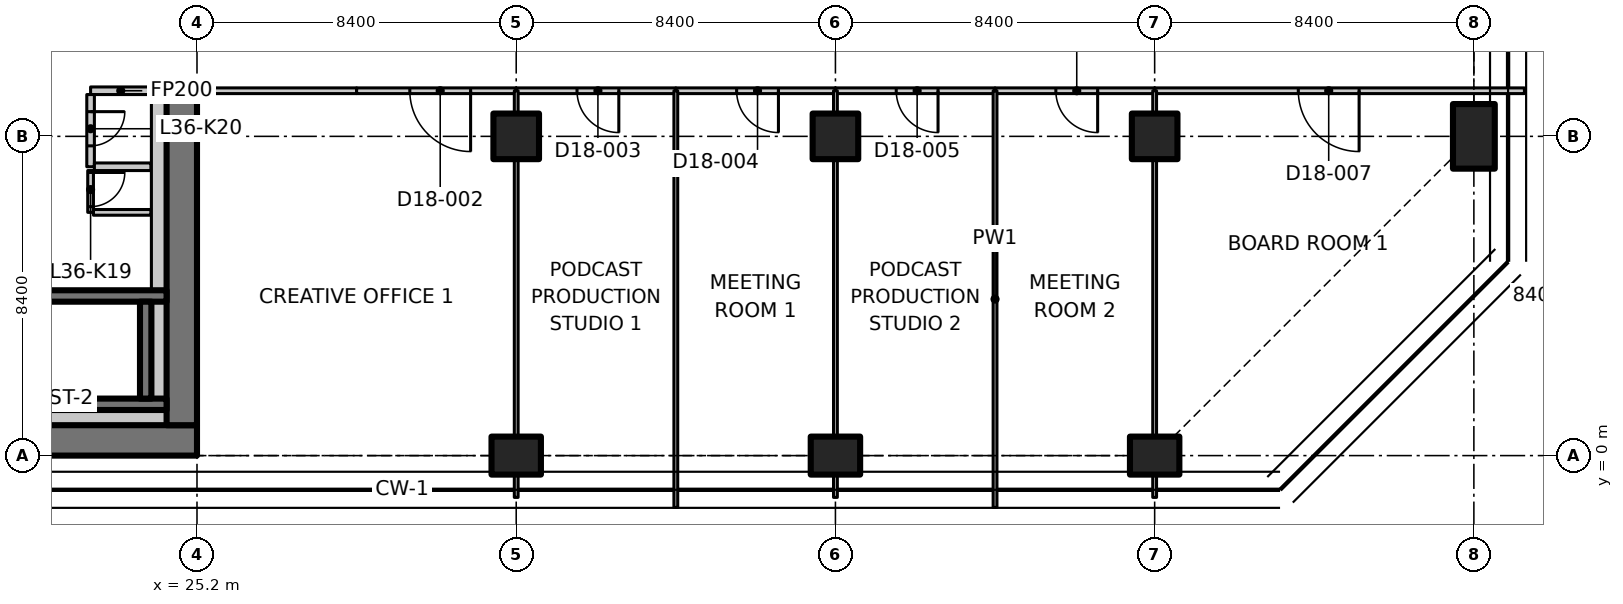
"""IFC4 building model, lengths in metres.
Left out: names, types, materials, properties, quantities, classifications, styles, units other than length and angle.
Written with IfcOpenShell. Run it as: python <this file> out.ifc"""

import sys

from ifc_helpers import new_model, si_unit, direction, frame, frame_2d, origin, origin_2d, place, context, subcontext, project, spatial, polyline, rectangle, outline, extrude, element, fill, save


model = new_model("IFC4")
c1 = context("Model", 3, precision=1e-05, world=origin(), true_north=direction((0.0, 1.0)))
c2 = subcontext(c1, "Body", "Model", "MODEL_VIEW")
j1 = project(units=[si_unit("LENGTHUNIT", "METRE"), si_unit("PLANEANGLEUNIT", "RADIAN")], contexts=[c1])
p1 = place(None, origin())
s1 = spatial("IfcSite", under=j1, at=p1, CompositionType="ELEMENT")
p2 = place(p1, origin())
s2 = spatial("IfcBuilding", under=s1, at=p2, CompositionType="ELEMENT")
p3 = place(p2, frame((0.0, 0.0, 145.7)))
s3 = spatial("IfcBuildingStorey", under=s2, at=p3, CompositionType="ELEMENT", Elevation=145.7)
p4 = place(p3, frame((33.6, 0.0, 0.0), z_axis=(0.0, 0.0, 1.0), x_axis=(0.0, 1.0, 0.0)))
e1 = element("IfcColumn", 1, at=p4, inside=s3, PredefinedType="COLUMN", context=c2, shape_type="SweptSolid", body=[
    extrude(rectangle(XDim=1.0, YDim=1.3, at=origin_2d()), origin(), (0.0, 0.0, 1.0), 3.35),
])
p5 = place(p3, frame((33.6, 8.4, 0.0), z_axis=(0.0, 0.0, 1.0), x_axis=(1.0, 0.0, 0.0)))
e2 = element("IfcColumn", 2, at=p5, inside=s3, PredefinedType="COLUMN", context=c2, shape_type="SweptSolid", body=[
    extrude(rectangle(XDim=1.2, YDim=1.2, at=origin_2d()), origin(), (0.0, 0.0, 1.0), 3.35),
])
p6 = place(p3, frame((42.0, 0.0, 0.0), z_axis=(0.0, 0.0, 1.0), x_axis=(0.0, 1.0, 0.0)))
e3 = element("IfcColumn", 3, at=p6, inside=s3, PredefinedType="COLUMN", context=c2, shape_type="SweptSolid", body=[
    extrude(rectangle(XDim=1.0, YDim=1.3, at=origin_2d()), origin(), (0.0, 0.0, 1.0), 3.35),
])
p7 = place(p3, frame((42.0, 8.4, 0.0), z_axis=(0.0, 0.0, 1.0), x_axis=(1.0, 0.0, 0.0)))
e4 = element("IfcColumn", 4, at=p7, inside=s3, PredefinedType="COLUMN", context=c2, shape_type="SweptSolid", body=[
    extrude(rectangle(XDim=1.2, YDim=1.2, at=origin_2d()), origin(), (0.0, 0.0, 1.0), 3.35),
])
p8 = place(p3, frame((50.4, 0.0, 0.0), z_axis=(0.0, 0.0, 1.0), x_axis=(0.0, 1.0, 0.0)))
e5 = element("IfcColumn", 5, at=p8, inside=s3, PredefinedType="COLUMN", context=c2, shape_type="SweptSolid", body=[
    extrude(rectangle(XDim=1.0, YDim=1.3, at=origin_2d()), origin(), (0.0, 0.0, 1.0), 3.35),
])
p9 = place(p3, frame((50.4, 8.4, 0.0), z_axis=(0.0, 0.0, 1.0), x_axis=(1.0, 0.0, 0.0)))
e6 = element("IfcColumn", 6, at=p9, inside=s3, PredefinedType="COLUMN", context=c2, shape_type="SweptSolid", body=[
    extrude(rectangle(XDim=1.2, YDim=1.2, at=origin_2d()), origin(), (0.0, 0.0, 1.0), 3.35),
])
p10 = place(p3, frame((58.8, 8.4, 0.0), z_axis=(0.0, 0.0, 1.0), x_axis=(1.0, 0.0, 0.0)))
e7 = element("IfcColumn", 7, at=p10, inside=s3, PredefinedType="COLUMN", context=c2, shape_type="SweptSolid", body=[
    extrude(rectangle(XDim=1.1, YDim=1.7, at=origin_2d()), origin(), (0.0, 0.0, 1.0), 3.35),
])
p11 = place(p3, frame((7.136, 0.4, 0.0), z_axis=(0.0, 0.0, 1.0), x_axis=(1.0, 0.0, 0.0)))
e8 = element("IfcWall", 8, at=p11, inside=s3, PredefinedType="SHEAR", context=c2, shape_type="SweptSolid", body=[
    extrude(rectangle(XDim=18.063, YDim=0.8, at=frame_2d((9.032, 0.0))), origin(), (0.0, 0.0, 1.0), 3.35),
])
p12 = place(p3, frame((24.8, 0.8, 0.0), z_axis=(0.0, 0.0, 1.0), x_axis=(0.0, 1.0, 0.0)))
e9 = element("IfcWall", 9, at=p12, inside=s3, PredefinedType="SHEAR", context=c2, shape_type="SweptSolid", body=[
    extrude(rectangle(XDim=9.0, YDim=0.8, at=frame_2d((4.5, 0.0))), origin(), (0.0, 0.0, 1.0), 3.35),
])
p13 = place(p3, frame((15.8, 1.35, 0.0), z_axis=(0.0, 0.0, 1.0), x_axis=(1.0, 0.0, 0.0)))
e10 = element("IfcWall", 10, at=p13, inside=s3, PredefinedType="SHEAR", context=c2, shape_type="SweptSolid", body=[
    extrude(rectangle(XDim=8.6, YDim=0.3, at=frame_2d((4.3, 0.0))), origin(), (0.0, 0.0, 1.0), 3.35),
])
p14 = place(p3, frame((15.8, 4.2, 0.0), z_axis=(0.0, 0.0, 1.0), x_axis=(1.0, 0.0, 0.0)))
e11 = element("IfcWall", 11, at=p14, inside=s3, PredefinedType="SHEAR", context=c2, shape_type="SweptSolid", body=[
    extrude(rectangle(XDim=8.6, YDim=0.3, at=frame_2d((4.3, 0.0))), origin(), (0.0, 0.0, 1.0), 3.35),
])
p15 = place(p14, frame((0.4, 0.0, 0.0)))
e12 = element("IfcOpeningElement", 12, at=p15, cuts=e11, PredefinedType="OPENING", context=c2, shape_type="SweptSolid", body=[
    extrude(rectangle(XDim=1.0, YDim=2.1, at=frame_2d((0.5, 1.05))), frame((0.0, 0.16, 0.0), z_axis=(0.0, -1.0, 0.0), x_axis=(1.0, 0.0, 0.0)), (0.0, 0.0, 1.0), 0.32),
])
p16 = place(p3, frame((23.85, 1.5, 0.0), z_axis=(0.0, 0.0, 1.0), x_axis=(0.0, 1.0, 0.0)))
e13 = element("IfcWall", 13, at=p16, inside=s3, PredefinedType="SHEAR", context=c2, shape_type="SweptSolid", body=[
    extrude(rectangle(XDim=2.55, YDim=0.3, at=frame_2d((1.275, 0.0))), origin(), (0.0, 0.0, 1.0), 3.35),
])
p17 = place(p3, frame((23.988, 9.6, 0.0), z_axis=(0.0, 0.0, 1.0), x_axis=(-1.0, 0.0, 0.0)))
e14 = element("IfcWall", 14, at=p17, inside=s3, PredefinedType="PARTITIONING", context=c2, shape_type="SweptSolid", body=[
    extrude(rectangle(XDim=1.588, YDim=0.2, at=frame_2d((0.794, 0.0))), origin(), (0.0, 0.0, 1.0), 3.35),
])
p18 = place(p3, frame((22.4, 9.5, 0.0), z_axis=(0.0, 0.0, 1.0), x_axis=(0.0, -1.0, 0.0)))
e15 = element("IfcWall", 15, at=p18, inside=s3, PredefinedType="PARTITIONING", context=c2, shape_type="SweptSolid", body=[
    extrude(rectangle(XDim=1.9, YDim=0.2, at=frame_2d((0.95, 0.0))), origin(), (0.0, 0.0, 1.0), 3.35),
])
p19 = place(p18, frame((0.45, 0.0, 0.0)))
e16 = element("IfcOpeningElement", 16, at=p19, cuts=e15, PredefinedType="OPENING", context=c2, shape_type="SweptSolid", body=[
    extrude(rectangle(XDim=0.9, YDim=2.1, at=frame_2d((0.45, 1.05))), frame((0.0, 0.11, 0.0), z_axis=(0.0, -1.0, 0.0), x_axis=(1.0, 0.0, 0.0)), (0.0, 0.0, 1.0), 0.22),
])
p20 = place(p3, frame((22.5, 7.6, 0.0), z_axis=(0.0, 0.0, 1.0), x_axis=(1.0, 0.0, 0.0)))
e17 = element("IfcWall", 17, at=p20, inside=s3, PredefinedType="PARTITIONING", context=c2, shape_type="SweptSolid", body=[
    extrude(rectangle(XDim=1.488, YDim=0.2, at=frame_2d((0.744, 0.0))), origin(), (0.0, 0.0, 1.0), 3.35),
])
p21 = place(p3, frame((22.4, 7.5, 0.0), z_axis=(0.0, 0.0, 1.0), x_axis=(0.0, -1.0, 0.0)))
e18 = element("IfcWall", 18, at=p21, inside=s3, PredefinedType="PARTITIONING", context=c2, shape_type="SweptSolid", body=[
    extrude(rectangle(XDim=1.1, YDim=0.15, at=frame_2d((0.55, 0.0))), origin(), (0.0, 0.0, 1.0), 3.35),
])
p22 = place(p21, frame((0.05, 0.0, 0.0)))
e19 = element("IfcOpeningElement", 19, at=p22, cuts=e18, PredefinedType="OPENING", context=c2, shape_type="SweptSolid", body=[
    extrude(rectangle(XDim=0.9, YDim=2.1, at=frame_2d((0.45, 1.05))), frame((0.0, 0.085, 0.0), z_axis=(0.0, -1.0, 0.0), x_axis=(1.0, 0.0, 0.0)), (0.0, 0.0, 1.0), 0.17),
])
p23 = place(p3, frame((22.475, 6.4, 0.0), z_axis=(0.0, 0.0, 1.0), x_axis=(1.0, 0.0, 0.0)))
e20 = element("IfcWall", 20, at=p23, inside=s3, PredefinedType="PARTITIONING", context=c2, shape_type="SweptSolid", body=[
    extrude(rectangle(XDim=1.513, YDim=0.15, at=frame_2d((0.756, 0.0))), origin(), (0.0, 0.0, 1.0), 3.35),
])
p24 = place(p3, frame((13.35, 1.0, 0.0), z_axis=(0.0, 0.0, 1.0), x_axis=(1.0, 0.0, 0.0)))
e21 = element("IfcWall", 21, at=p24, inside=s3, PredefinedType="PARTITIONING", context=c2, shape_type="SweptSolid", body=[
    extrude(rectangle(XDim=11.05, YDim=0.4, at=frame_2d((5.525, 0.0))), origin(), (0.0, 0.0, 1.0), 3.35),
])
p25 = place(p3, frame((24.2, 1.5, 0.0), z_axis=(0.0, 0.0, 1.0), x_axis=(0.0, 1.0, 0.0)))
e22 = element("IfcWall", 22, at=p25, inside=s3, PredefinedType="PARTITIONING", context=c2, shape_type="SweptSolid", body=[
    extrude(rectangle(XDim=2.55, YDim=0.4, at=frame_2d((1.275, 0.0))), origin(), (0.0, 0.0, 1.0), 3.35),
])
p26 = place(p3, frame((24.2, 4.35, 0.0), z_axis=(0.0, 0.0, 1.0), x_axis=(0.0, 1.0, 0.0)))
e23 = element("IfcWall", 23, at=p26, inside=s3, PredefinedType="PARTITIONING", context=c2, shape_type="SweptSolid", body=[
    extrude(rectangle(XDim=5.45, YDim=0.4, at=frame_2d((2.725, 0.0))), origin(), (0.0, 0.0, 1.0), 3.35),
])
p27 = place(p3, frame((29.4, 9.6, 0.0), z_axis=(0.0, 0.0, 1.0), x_axis=(-1.0, 0.0, 0.0)))
e24 = element("IfcWall", 24, at=p27, inside=s3, PredefinedType="PARTITIONING", context=c2, shape_type="SweptSolid", body=[
    extrude(rectangle(XDim=4.2, YDim=0.15, at=frame_2d((2.1, 0.0))), origin(), (0.0, 0.0, 1.0), 3.33),
])
p28 = place(p3, frame((33.6, 9.6, 0.0), z_axis=(0.0, 0.0, 1.0), x_axis=(-1.0, 0.0, 0.0)))
e25 = element("IfcWall", 25, at=p28, inside=s3, PredefinedType="PARTITIONING", context=c2, shape_type="SweptSolid", body=[
    extrude(rectangle(XDim=4.2, YDim=0.15, at=frame_2d((2.1, 0.0))), origin(), (0.0, 0.0, 1.0), 3.33),
])
p29 = place(p28, frame((1.2, 0.0, 0.0)))
e26 = element("IfcOpeningElement", 26, at=p29, cuts=e25, PredefinedType="OPENING", context=c2, shape_type="SweptSolid", body=[
    extrude(rectangle(XDim=1.6, YDim=2.1, at=frame_2d((0.8, 1.05))), frame((0.0, 0.085, 0.0), z_axis=(0.0, -1.0, 0.0), x_axis=(1.0, 0.0, 0.0)), (0.0, 0.0, 1.0), 0.17),
])
p30 = place(p3, frame((37.8, 9.6, 0.0), z_axis=(0.0, 0.0, 1.0), x_axis=(-1.0, 0.0, 0.0)))
e27 = element("IfcWall", 27, at=p30, inside=s3, PredefinedType="PARTITIONING", context=c2, shape_type="SweptSolid", body=[
    extrude(rectangle(XDim=4.2, YDim=0.15, at=frame_2d((2.1, 0.0))), origin(), (0.0, 0.0, 1.0), 3.33),
])
p31 = place(p30, frame((1.5, 0.0, 0.0)))
e28 = element("IfcOpeningElement", 28, at=p31, cuts=e27, PredefinedType="OPENING", context=c2, shape_type="SweptSolid", body=[
    extrude(rectangle(XDim=1.1, YDim=2.1, at=frame_2d((0.55, 1.05))), frame((0.0, 0.085, 0.0), z_axis=(0.0, -1.0, 0.0), x_axis=(1.0, 0.0, 0.0)), (0.0, 0.0, 1.0), 0.17),
])
p32 = place(p3, frame((42.0, 9.6, 0.0), z_axis=(0.0, 0.0, 1.0), x_axis=(-1.0, 0.0, 0.0)))
e29 = element("IfcWall", 29, at=p32, inside=s3, PredefinedType="PARTITIONING", context=c2, shape_type="SweptSolid", body=[
    extrude(rectangle(XDim=4.2, YDim=0.15, at=frame_2d((2.1, 0.0))), origin(), (0.0, 0.0, 1.0), 3.33),
])
p33 = place(p32, frame((1.5, 0.0, 0.0)))
e30 = element("IfcOpeningElement", 30, at=p33, cuts=e29, PredefinedType="OPENING", context=c2, shape_type="SweptSolid", body=[
    extrude(rectangle(XDim=1.1, YDim=2.1, at=frame_2d((0.55, 1.05))), frame((0.0, 0.085, 0.0), z_axis=(0.0, -1.0, 0.0), x_axis=(1.0, 0.0, 0.0)), (0.0, 0.0, 1.0), 0.17),
])
p34 = place(p3, frame((46.2, 9.6, 0.0), z_axis=(0.0, 0.0, 1.0), x_axis=(-1.0, 0.0, 0.0)))
e31 = element("IfcWall", 31, at=p34, inside=s3, PredefinedType="PARTITIONING", context=c2, shape_type="SweptSolid", body=[
    extrude(rectangle(XDim=4.2, YDim=0.15, at=frame_2d((2.1, 0.0))), origin(), (0.0, 0.0, 1.0), 3.33),
])
p35 = place(p34, frame((1.5, 0.0, 0.0)))
e32 = element("IfcOpeningElement", 32, at=p35, cuts=e31, PredefinedType="OPENING", context=c2, shape_type="SweptSolid", body=[
    extrude(rectangle(XDim=1.1, YDim=2.1, at=frame_2d((0.55, 1.05))), frame((0.0, 0.085, 0.0), z_axis=(0.0, -1.0, 0.0), x_axis=(1.0, 0.0, 0.0)), (0.0, 0.0, 1.0), 0.17),
])
p36 = place(p3, frame((50.4, 9.6, 0.0), z_axis=(0.0, 0.0, 1.0), x_axis=(-1.0, 0.0, 0.0)))
e33 = element("IfcWall", 33, at=p36, inside=s3, PredefinedType="PARTITIONING", context=c2, shape_type="SweptSolid", body=[
    extrude(rectangle(XDim=4.2, YDim=0.15, at=frame_2d((2.1, 0.0))), origin(), (0.0, 0.0, 1.0), 3.33),
])
p37 = place(p36, frame((1.5, 0.0, 0.0)))
e34 = element("IfcOpeningElement", 34, at=p37, cuts=e33, PredefinedType="OPENING", context=c2, shape_type="SweptSolid", body=[
    extrude(rectangle(XDim=1.1, YDim=2.1, at=frame_2d((0.55, 1.05))), frame((0.0, 0.085, 0.0), z_axis=(0.0, -1.0, 0.0), x_axis=(1.0, 0.0, 0.0)), (0.0, 0.0, 1.0), 0.17),
])
p38 = place(p3, frame((60.131, 9.6, 0.0), z_axis=(0.0, 0.0, 1.0), x_axis=(-1.0, 0.0, 0.0)))
e35 = element("IfcWall", 35, at=p38, inside=s3, PredefinedType="PARTITIONING", context=c2, shape_type="SweptSolid", body=[
    extrude(outline(polyline([(0.0, 0.0), (9.731, 0.0), (9.73, 3.33), (1.781, 3.33), (1.779, 2.98), (0.883, 2.98), (0.881, 3.33), (0.25, 3.33), (0.0, 3.33), (0.0, 0.0)])), frame((0.0, 0.075, 0.0), z_axis=(0.0, -1.0, 0.0), x_axis=(1.0, 0.0, 0.0)), (0.0, 0.0, 1.0), 0.15),
])
p39 = place(p38, frame((4.351, 0.0, 0.0)))
e36 = element("IfcOpeningElement", 36, at=p39, cuts=e35, PredefinedType="OPENING", context=c2, shape_type="SweptSolid", body=[
    extrude(rectangle(XDim=1.6, YDim=2.1, at=frame_2d((0.8, 1.05))), frame((0.0, 0.085, 0.0), z_axis=(0.0, -1.0, 0.0), x_axis=(1.0, 0.0, 0.0)), (0.0, 0.0, 1.0), 0.17),
])
p40 = place(p3, frame((33.6, 9.6, 0.0), z_axis=(0.0, 0.0, 1.0), x_axis=(0.0, -1.0, 0.0)))
e37 = element("IfcWall", 37, at=p40, inside=s3, PredefinedType="PARTITIONING", context=c2, shape_type="SweptSolid", body=[
    extrude(rectangle(XDim=0.58, YDim=0.1, at=frame_2d((0.29, 0.0))), origin(), (0.0, 0.0, 1.0), 3.33),
])
p41 = place(p3, frame((33.6, 7.78, 0.0), z_axis=(0.0, 0.0, 1.0), x_axis=(0.0, -1.0, 0.0)))
e38 = element("IfcWall", 38, at=p41, inside=s3, PredefinedType="PARTITIONING", context=c2, shape_type="SweptSolid", body=[
    extrude(rectangle(XDim=7.26, YDim=0.1, at=frame_2d((3.63, 0.0))), origin(), (0.0, 0.0, 1.0), 3.33),
])
p42 = place(p3, frame((33.6, -0.52, 0.0), z_axis=(0.0, 0.0, 1.0), x_axis=(0.0, -1.0, 0.0)))
e39 = element("IfcWall", 39, at=p42, inside=s3, PredefinedType="PARTITIONING", context=c2, shape_type="SweptSolid", body=[
    extrude(rectangle(XDim=0.58, YDim=0.1, at=frame_2d((0.29, 0.0))), origin(), (0.0, 0.0, 1.0), 3.33),
])
p43 = place(p3, frame((37.8, 9.6, 0.0), z_axis=(0.0, 0.0, 1.0), x_axis=(0.0, -1.0, 0.0)))
e40 = element("IfcWall", 40, at=p43, inside=s3, PredefinedType="PARTITIONING", context=c2, shape_type="SweptSolid", body=[
    extrude(outline(polyline([(0.0, 0.0), (10.965, 0.0), (10.965, 3.33), (10.7, 3.33), (10.05, 3.33), (10.048, 2.98), (9.152, 2.98), (9.15, 3.33), (0.0, 3.33), (0.0, 0.0)])), frame((0.0, 0.05, 0.0), z_axis=(0.0, -1.0, 0.0), x_axis=(1.0, 0.0, 0.0)), (0.0, 0.0, 1.0), 0.1),
])
p44 = place(p3, frame((42.0, 9.6, 0.0), z_axis=(0.0, 0.0, 1.0), x_axis=(0.0, -1.0, 0.0)))
e41 = element("IfcWall", 41, at=p44, inside=s3, PredefinedType="PARTITIONING", context=c2, shape_type="SweptSolid", body=[
    extrude(rectangle(XDim=0.58, YDim=0.1, at=frame_2d((0.29, 0.0))), origin(), (0.0, 0.0, 1.0), 3.33),
])
p45 = place(p3, frame((42.0, 7.78, 0.0), z_axis=(0.0, 0.0, 1.0), x_axis=(0.0, -1.0, 0.0)))
e42 = element("IfcWall", 42, at=p45, inside=s3, PredefinedType="PARTITIONING", context=c2, shape_type="SweptSolid", body=[
    extrude(rectangle(XDim=7.26, YDim=0.1, at=frame_2d((3.63, 0.0))), origin(), (0.0, 0.0, 1.0), 3.33),
])
p46 = place(p3, frame((42.0, -0.52, 0.0), z_axis=(0.0, 0.0, 1.0), x_axis=(0.0, -1.0, 0.0)))
e43 = element("IfcWall", 43, at=p46, inside=s3, PredefinedType="PARTITIONING", context=c2, shape_type="SweptSolid", body=[
    extrude(rectangle(XDim=0.58, YDim=0.1, at=frame_2d((0.29, 0.0))), origin(), (0.0, 0.0, 1.0), 3.33),
])
p47 = place(p3, frame((46.2, 9.6, 0.0), z_axis=(0.0, 0.0, 1.0), x_axis=(0.0, -1.0, 0.0)))
e44 = element("IfcWall", 44, at=p47, inside=s3, PredefinedType="PARTITIONING", context=c2, shape_type="SweptSolid", body=[
    extrude(outline(polyline([(0.0, 0.0), (10.965, 0.0), (10.965, 3.33), (10.7, 3.33), (10.05, 3.33), (10.048, 2.98), (9.152, 2.98), (9.15, 3.33), (0.0, 3.33), (0.0, 0.0)])), frame((0.0, 0.05, 0.0), z_axis=(0.0, -1.0, 0.0), x_axis=(1.0, 0.0, 0.0)), (0.0, 0.0, 1.0), 0.1),
])
p48 = place(p3, frame((50.4, 9.6, 0.0), z_axis=(0.0, 0.0, 1.0), x_axis=(0.0, -1.0, 0.0)))
e45 = element("IfcWall", 45, at=p48, inside=s3, PredefinedType="PARTITIONING", context=c2, shape_type="SweptSolid", body=[
    extrude(rectangle(XDim=0.58, YDim=0.1, at=frame_2d((0.29, 0.0))), origin(), (0.0, 0.0, 1.0), 3.33),
])
p49 = place(p3, frame((50.4, 7.78, 0.0), z_axis=(0.0, 0.0, 1.0), x_axis=(0.0, -1.0, 0.0)))
e46 = element("IfcWall", 46, at=p49, inside=s3, PredefinedType="PARTITIONING", context=c2, shape_type="SweptSolid", body=[
    extrude(outline(polyline([(0.0, 0.0), (7.26, 0.0), (7.26, 2.98), (7.116, 2.98), (7.114, 3.33), (0.0, 3.33), (0.0, 0.0)])), frame((0.0, 0.05, 0.0), z_axis=(0.0, -1.0, 0.0), x_axis=(1.0, 0.0, 0.0)), (0.0, 0.0, 1.0), 0.1),
])
p50 = place(p3, frame((50.4, -0.52, 0.0), z_axis=(0.0, 0.0, 1.0), x_axis=(0.0, -1.0, 0.0)))
e47 = element("IfcWall", 47, at=p50, inside=s3, PredefinedType="PARTITIONING", context=c2, shape_type="SweptSolid", body=[
    extrude(rectangle(XDim=0.58, YDim=0.1, at=frame_2d((0.29, 0.0))), origin(), (0.0, 0.0, 1.0), 3.33),
])
p51 = place(p22, origin())
e48 = element("IfcDoor", 48, at=p51, inside=s3, OperationType="SINGLE_SWING_LEFT", PredefinedType="DOOR", context=c2, shape_type="SweptSolid", body=[
    extrude(rectangle(XDim=0.9, YDim=2.1, at=frame_2d((0.45, 1.05))), frame((0.0, 0.025, 0.0), z_axis=(0.0, -1.0, 0.0), x_axis=(1.0, 0.0, 0.0)), (0.0, 0.0, 1.0), 0.05),
])
fill(e19, e48)
p52 = place(p19, origin())
e49 = element("IfcDoor", 49, at=p52, inside=s3, OperationType="SINGLE_SWING_RIGHT", PredefinedType="DOOR", context=c2, shape_type="SweptSolid", body=[
    extrude(rectangle(XDim=0.9, YDim=2.1, at=frame_2d((0.45, 1.05))), frame((0.0, 0.025, 0.0), z_axis=(0.0, -1.0, 0.0), x_axis=(1.0, 0.0, 0.0)), (0.0, 0.0, 1.0), 0.05),
])
fill(e16, e49)
p53 = place(p29, origin())
e50 = element("IfcDoor", 50, at=p53, inside=s3, OperationType="DOUBLE_DOOR_SINGLE_SWING", PredefinedType="DOOR", context=c2, shape_type="SweptSolid", body=[
    extrude(rectangle(XDim=1.6, YDim=2.1, at=frame_2d((0.8, 1.05))), frame((0.0, 0.025, 0.0), z_axis=(0.0, -1.0, 0.0), x_axis=(1.0, 0.0, 0.0)), (0.0, 0.0, 1.0), 0.05),
])
fill(e26, e50)
p54 = place(p31, origin())
e51 = element("IfcDoor", 51, at=p54, inside=s3, OperationType="SINGLE_SWING_LEFT", PredefinedType="DOOR", context=c2, shape_type="SweptSolid", body=[
    extrude(rectangle(XDim=1.1, YDim=2.1, at=frame_2d((0.55, 1.05))), frame((0.0, 0.025, 0.0), z_axis=(0.0, -1.0, 0.0), x_axis=(1.0, 0.0, 0.0)), (0.0, 0.0, 1.0), 0.05),
])
fill(e28, e51)
p55 = place(p33, origin())
e52 = element("IfcDoor", 52, at=p55, inside=s3, OperationType="SINGLE_SWING_LEFT", PredefinedType="DOOR", context=c2, shape_type="SweptSolid", body=[
    extrude(rectangle(XDim=1.1, YDim=2.1, at=frame_2d((0.55, 1.05))), frame((0.0, 0.025, 0.0), z_axis=(0.0, -1.0, 0.0), x_axis=(1.0, 0.0, 0.0)), (0.0, 0.0, 1.0), 0.05),
])
fill(e30, e52)
p56 = place(p35, origin())
e53 = element("IfcDoor", 53, at=p56, inside=s3, OperationType="SINGLE_SWING_LEFT", PredefinedType="DOOR", context=c2, shape_type="SweptSolid", body=[
    extrude(rectangle(XDim=1.1, YDim=2.1, at=frame_2d((0.55, 1.05))), frame((0.0, 0.025, 0.0), z_axis=(0.0, -1.0, 0.0), x_axis=(1.0, 0.0, 0.0)), (0.0, 0.0, 1.0), 0.05),
])
fill(e32, e53)
p57 = place(p37, origin())
e54 = element("IfcDoor", 54, at=p57, inside=s3, OperationType="SINGLE_SWING_LEFT", PredefinedType="DOOR", context=c2, shape_type="SweptSolid", body=[
    extrude(rectangle(XDim=1.1, YDim=2.1, at=frame_2d((0.55, 1.05))), frame((0.0, 0.025, 0.0), z_axis=(0.0, -1.0, 0.0), x_axis=(1.0, 0.0, 0.0)), (0.0, 0.0, 1.0), 0.05),
])
fill(e34, e54)
p58 = place(p39, origin())
e55 = element("IfcDoor", 55, at=p58, inside=s3, OperationType="DOUBLE_DOOR_SINGLE_SWING", PredefinedType="DOOR", context=c2, shape_type="SweptSolid", body=[
    extrude(rectangle(XDim=1.6, YDim=2.1, at=frame_2d((0.8, 1.05))), frame((0.0, 0.025, 0.0), z_axis=(0.0, -1.0, 0.0), x_axis=(1.0, 0.0, 0.0)), (0.0, 0.0, 1.0), 0.05),
])
fill(e36, e55)
save(model, sys.argv[1])
